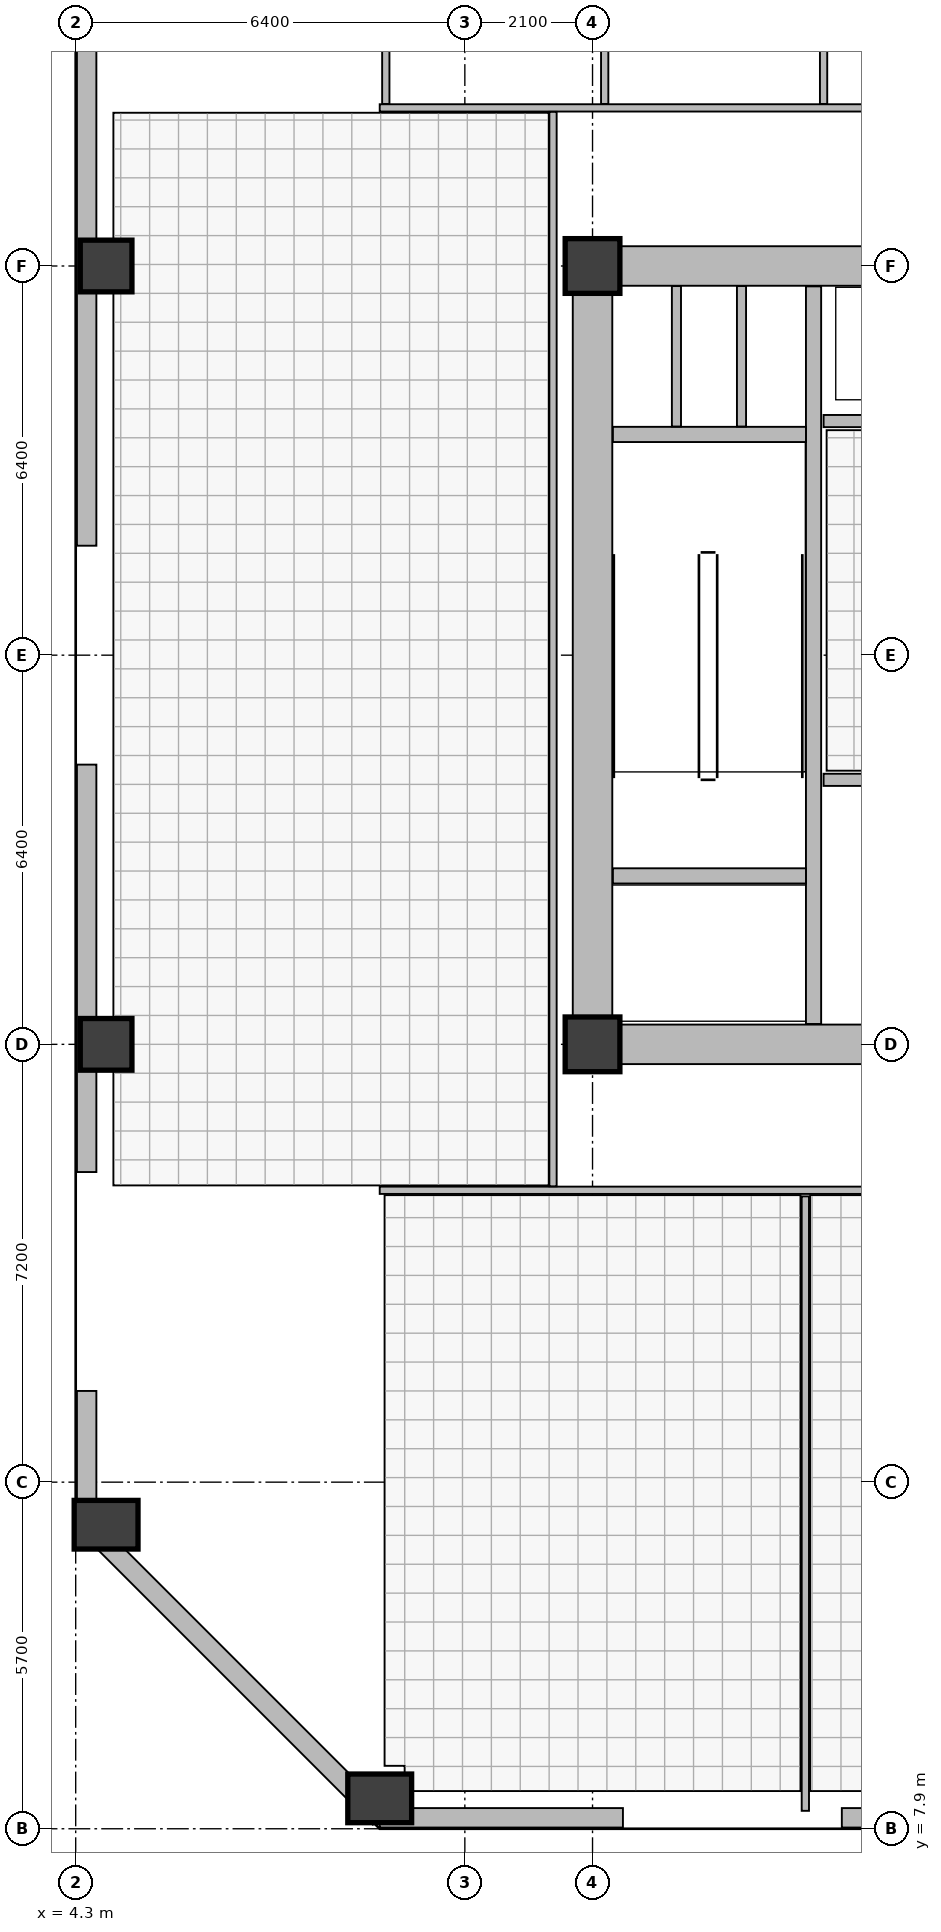
"""IFC4 building model, lengths in metres.
Left out: names, types, materials, properties, quantities, classifications, styles, units other than length and angle.
Written with IfcOpenShell. Run it as: python <this file> out.ifc"""

import sys

from ifc_helpers import new_model, si_unit, direction, frame, frame_2d, origin, origin_2d, place, context, subcontext, project, spatial, rectangle, extrude, element, fill, save


model = new_model("IFC4")
c1 = context("Model", 3, precision=1e-05, world=origin(), true_north=direction((0.0, 1.0)))
c2 = subcontext(c1, "Body", "Model", "MODEL_VIEW")
j1 = project(units=[si_unit("LENGTHUNIT", "METRE"), si_unit("PLANEANGLEUNIT", "RADIAN")], contexts=[c1])
p1 = place(None, origin())
s1 = spatial("IfcSite", under=j1, at=p1, CompositionType="ELEMENT")
p2 = place(p1, origin())
s2 = spatial("IfcBuilding", under=s1, at=p2, CompositionType="ELEMENT")
p3 = place(p2, frame((0.0, 0.0, 202.7)))
s3 = spatial("IfcBuildingStorey", under=s2, at=p3, CompositionType="ELEMENT", Elevation=202.7)
for number, where, z_axis, x_axis in (
    (1, (12.8, 20.8, 0.0), (0.0, 0.0, 1.0), (1.0, 0.0, 0.0)),
    (2, (12.8, 33.6, 0.0), (0.0, 0.0, 1.0), (1.0, 0.0, 0.0)),
):
    element("IfcColumn", number, at=place(p3, frame(where, z_axis=z_axis, x_axis=x_axis)), inside=s3, PredefinedType="COLUMN", context=c2, shape_type="SweptSolid", body=[
        extrude(rectangle(XDim=0.9, YDim=0.9, at=origin_2d()), origin(), (0.0, 0.0, 1.0), 4.8),
    ])
for number, where, z_axis, x_axis in (
    (3, (9.3, 8.4, 0.0), (0.0, 0.0, 1.0), (1.0, 0.0, 0.0)),
    (4, (4.8, 12.9, 0.0), (0.0, 0.0, 1.0), (1.0, 0.0, 0.0)),
):
    element("IfcColumn", number, at=place(p3, frame(where, z_axis=z_axis, x_axis=x_axis)), inside=s3, PredefinedType="COLUMN", context=c2, shape_type="SweptSolid", body=[
        extrude(rectangle(XDim=0.8, YDim=1.05, at=origin_2d()), origin(), (0.0, 0.0, 1.0), 4.8),
    ])
for number, where, z_axis, x_axis in (
    (5, (4.8, 20.8, 0.0), (0.0, 0.0, 1.0), (1.0, 0.0, 0.0)),
    (6, (4.8, 33.6, 0.0), (0.0, 0.0, 1.0), (1.0, 0.0, 0.0)),
):
    element("IfcColumn", number, at=place(p3, frame(where, z_axis=z_axis, x_axis=x_axis)), inside=s3, PredefinedType="COLUMN", context=c2, shape_type="SweptSolid", body=[
        extrude(rectangle(XDim=0.85, YDim=0.85, at=origin_2d()), origin(), (0.0, 0.0, 1.0), 4.8),
    ])
p4 = place(p3, frame((22.6, 8.08, 0.0), z_axis=(0.0, 0.0, 1.0), x_axis=(-1.0, 0.0, 0.0)))
e7 = element("IfcWall", 7, at=p4, inside=s3, PredefinedType="STANDARD", context=c2, shape_type="SweptSolid", body=[
    extrude(rectangle(XDim=5.7, YDim=0.32, at=frame_2d((2.85, 0.0))), origin(), (0.0, 0.0, 1.0), 3.735),
])
p5 = place(p3, frame((13.3, 8.08, 0.0), z_axis=(0.0, 0.0, 1.0), x_axis=(-1.0, 0.0, 0.0)))
e8 = element("IfcWall", 8, at=p5, inside=s3, PredefinedType="STANDARD", context=c2, shape_type="SweptSolid", body=[
    extrude(rectangle(XDim=4.0, YDim=0.32, at=frame_2d((2.0, 0.0))), origin(), (0.0, 0.0, 1.0), 3.735),
])
p6 = place(p3, frame((9.3, 8.08, 0.0), z_axis=(0.0, 0.0, 1.0), x_axis=(-0.707124689198, 0.707088872722, 0.0)))
e9 = element("IfcWall", 9, at=p6, inside=s3, PredefinedType="STANDARD", context=c2, shape_type="SweptSolid", body=[
    extrude(rectangle(XDim=6.816, YDim=0.32, at=frame_2d((3.408, 0.0))), origin(), (0.0, 0.0, 1.0), 3.735),
])
p7 = place(p3, frame((4.48, 12.9, 0.0), z_axis=(0.0, 0.0, 1.0), x_axis=(0.0, 1.0, 0.0)))
e10 = element("IfcWall", 10, at=p7, inside=s3, PredefinedType="STANDARD", context=c2, shape_type="SweptSolid", body=[
    extrude(rectangle(XDim=2.2, YDim=0.32, at=frame_2d((1.1, 0.0))), origin(), (0.0, 0.0, 1.0), 3.735),
])
p8 = place(p3, frame((4.48, 18.7, 0.0), z_axis=(0.0, 0.0, 1.0), x_axis=(0.0, 1.0, 0.0)))
e11 = element("IfcWall", 11, at=p8, inside=s3, PredefinedType="STANDARD", context=c2, shape_type="SweptSolid", body=[
    extrude(rectangle(XDim=6.7, YDim=0.32, at=frame_2d((3.35, 0.0))), origin(), (0.0, 0.0, 1.0), 3.735),
])
p9 = place(p3, frame((4.48, 29.0, 0.0), z_axis=(0.0, 0.0, 1.0), x_axis=(0.0, 1.0, 0.0)))
e12 = element("IfcWall", 12, at=p9, inside=s3, PredefinedType="STANDARD", context=c2, shape_type="SweptSolid", body=[
    extrude(rectangle(XDim=18.9, YDim=0.32, at=frame_2d((9.45, 0.0))), origin(), (0.0, 0.0, 1.0), 3.735),
])
p10 = place(p3, frame((12.8, 21.255, 0.0), z_axis=(0.0, 0.0, 1.0), x_axis=(0.0, 1.0, 0.0)))
e13 = element("IfcWall", 13, at=p10, inside=s3, PredefinedType="SHEAR", context=c2, shape_type="SweptSolid", body=[
    extrude(rectangle(XDim=11.89, YDim=0.65, at=frame_2d((5.945, 0.0))), origin(), (0.0, 0.0, 1.0), 4.35),
])
p11 = place(p3, frame((13.255, 20.8, 0.0), z_axis=(0.0, 0.0, 1.0), x_axis=(1.0, 0.0, 0.0)))
e14 = element("IfcWall", 14, at=p11, inside=s3, PredefinedType="SHEAR", context=c2, shape_type="SweptSolid", body=[
    extrude(rectangle(XDim=7.09, YDim=0.65, at=frame_2d((3.545, 0.0))), origin(), (0.0, 0.0, 1.0), 4.35),
])
p12 = place(p3, frame((13.255, 33.6, 0.0), z_axis=(0.0, 0.0, 1.0), x_axis=(1.0, 0.0, 0.0)))
e15 = element("IfcWall", 15, at=p12, inside=s3, PredefinedType="SHEAR", context=c2, shape_type="SweptSolid", body=[
    extrude(rectangle(XDim=7.09, YDim=0.65, at=frame_2d((3.545, 0.0))), origin(), (0.0, 0.0, 1.0), 4.35),
])
p13 = place(p12, frame((2.115, 0.0, 0.0)))
e16 = element("IfcOpeningElement", 16, at=p13, cuts=e15, PredefinedType="OPENING", context=c2, shape_type="SweptSolid", body=[
    extrude(rectangle(XDim=0.85, YDim=2.02, at=frame_2d((0.425, 1.01))), frame((0.0, 0.335, 0.0), z_axis=(0.0, -1.0, 0.0), x_axis=(1.0, 0.0, 0.0)), (0.0, 0.0, 1.0), 0.67),
])
p14 = place(p3, frame((16.435, 21.135, 0.0), z_axis=(0.0, 0.0, 1.0), x_axis=(0.0, 1.0, 0.0)))
e17 = element("IfcWall", 17, at=p14, inside=s3, PredefinedType="SHEAR", context=c2, shape_type="SweptSolid", body=[
    extrude(rectangle(XDim=12.13, YDim=0.25, at=frame_2d((6.065, 0.0))), origin(), (0.0, 0.0, 1.0), 4.35),
])
p15 = place(p14, frame((0.515, 0.0, 0.0)))
e18 = element("IfcOpeningElement", 18, at=p15, cuts=e17, PredefinedType="OPENING", context=c2, shape_type="SweptSolid", body=[
    extrude(rectangle(XDim=1.2, YDim=2.15, at=frame_2d((0.6, 1.075))), frame((0.0, 0.135, 0.0), z_axis=(0.0, -1.0, 0.0), x_axis=(1.0, 0.0, 0.0)), (0.0, 0.0, 1.0), 0.27),
])
p16 = place(p14, frame((2.665, 0.0, 0.0)))
e19 = element("IfcOpeningElement", 19, at=p16, cuts=e17, PredefinedType="OPENING", context=c2, shape_type="SweptSolid", body=[
    extrude(rectangle(XDim=1.15, YDim=2.15, at=frame_2d((0.575, 1.075))), frame((0.0, 0.135, 0.0), z_axis=(0.0, -1.0, 0.0), x_axis=(1.0, 0.0, 0.0)), (0.0, 0.0, 1.0), 0.27),
])
for number, where, z_axis, x_axis in (
    (20, (13.135, 23.57, 0.0), (0.0, 0.0, 1.0), (1.0, 0.0, 0.0)),
    (21, (13.135, 30.83, 0.0), (0.0, 0.0, 1.0), (1.0, 0.0, 0.0)),
):
    element("IfcWall", number, at=place(p3, frame(where, z_axis=z_axis, x_axis=x_axis)), inside=s3, PredefinedType="SHEAR", context=c2, shape_type="SweptSolid", body=[
        extrude(rectangle(XDim=3.175, YDim=0.25, at=frame_2d((1.587, 0.0))), origin(), (0.0, 0.0, 1.0), 4.35),
    ])
for number, where, z_axis, x_axis in (
    (22, (16.6, 25.15, 0.0), (0.0, 0.0, 1.0), (1.0, 0.0, 0.0)),
    (23, (16.6, 31.05, 0.0), (0.0, 0.0, 1.0), (1.0, 0.0, 0.0)),
):
    element("IfcWall", number, at=place(p3, frame(where, z_axis=z_axis, x_axis=x_axis)), inside=s3, PredefinedType="SOLIDWALL", context=c2, shape_type="SweptSolid", body=[
        extrude(rectangle(XDim=3.85, YDim=0.2, at=frame_2d((1.925, 0.0))), origin(), (0.0, 0.0, 1.0), 4.35),
    ])
p17 = place(p3, frame((14.18, 30.96, 0.0), z_axis=(0.0, 0.0, 1.0), x_axis=(0.0, 1.0, 0.0)))
e24 = element("IfcWall", 24, at=p17, inside=s3, PredefinedType="PARTITIONING", context=c2, shape_type="SweptSolid", body=[
    extrude(rectangle(XDim=2.31, YDim=0.15, at=frame_2d((1.155, 0.0))), origin(), (0.0, 0.0, 1.0), 4.35),
])
p18 = place(p17, frame((0.47, 0.0, 0.0)))
e25 = element("IfcOpeningElement", 25, at=p18, cuts=e24, PredefinedType="OPENING", context=c2, shape_type="SweptSolid", body=[
    extrude(rectangle(XDim=0.85, YDim=2.02, at=frame_2d((0.425, 1.01))), frame((0.0, 0.085, 0.0), z_axis=(0.0, -1.0, 0.0), x_axis=(1.0, 0.0, 0.0)), (0.0, 0.0, 1.0), 0.17),
])
p19 = place(p3, frame((15.25, 30.96, 0.0), z_axis=(0.0, 0.0, 1.0), x_axis=(0.0, 1.0, 0.0)))
e26 = element("IfcWall", 26, at=p19, inside=s3, PredefinedType="PARTITIONING", context=c2, shape_type="SweptSolid", body=[
    extrude(rectangle(XDim=2.31, YDim=0.15, at=frame_2d((1.155, 0.0))), origin(), (0.0, 0.0, 1.0), 4.35),
])
p20 = place(p19, frame((0.47, 0.0, 0.0)))
e27 = element("IfcOpeningElement", 27, at=p20, cuts=e26, PredefinedType="OPENING", context=c2, shape_type="SweptSolid", body=[
    extrude(rectangle(XDim=0.85, YDim=2.02, at=frame_2d((0.425, 1.01))), frame((0.0, 0.085, 0.0), z_axis=(0.0, -1.0, 0.0), x_axis=(1.0, 0.0, 0.0)), (0.0, 0.0, 1.0), 0.17),
])
p21 = place(p3, frame((9.3, 18.4, 0.0), z_axis=(0.0, 0.0, 1.0), x_axis=(1.0, 0.0, 0.0)))
e28 = element("IfcWall", 28, at=p21, inside=s3, PredefinedType="PARTITIONING", context=c2, shape_type="SweptSolid", body=[
    extrude(rectangle(XDim=35.0, YDim=0.12, at=frame_2d((17.5, 0.0))), origin(), (0.0, 0.0, 1.0), 4.35),
])
p22 = place(p21, frame((2.2, 0.0, 0.0)))
e29 = element("IfcOpeningElement", 29, at=p22, cuts=e28, PredefinedType="OPENING", context=c2, shape_type="SweptSolid", body=[
    extrude(rectangle(XDim=1.0, YDim=2.1, at=frame_2d((0.5, 1.05))), frame((0.0, 0.07, 0.0), z_axis=(0.0, -1.0, 0.0), x_axis=(1.0, 0.0, 0.0)), (0.0, 0.0, 1.0), 0.14),
])
p23 = place(p21, frame((9.2, 0.0, 0.0)))
e30 = element("IfcOpeningElement", 30, at=p23, cuts=e28, PredefinedType="OPENING", context=c2, shape_type="SweptSolid", body=[
    extrude(rectangle(XDim=1.0, YDim=2.1, at=frame_2d((0.5, 1.05))), frame((0.0, 0.07, 0.0), z_axis=(0.0, -1.0, 0.0), x_axis=(1.0, 0.0, 0.0)), (0.0, 0.0, 1.0), 0.14),
])
p24 = place(p21, frame((16.55, 0.0, 0.0)))
e31 = element("IfcOpeningElement", 31, at=p24, cuts=e28, PredefinedType="OPENING", context=c2, shape_type="SweptSolid", body=[
    extrude(rectangle(XDim=1.0, YDim=2.1, at=frame_2d((0.5, 1.05))), frame((0.0, 0.07, 0.0), z_axis=(0.0, -1.0, 0.0), x_axis=(1.0, 0.0, 0.0)), (0.0, 0.0, 1.0), 0.14),
])
p25 = place(p21, frame((23.9, 0.0, 0.0)))
e32 = element("IfcOpeningElement", 32, at=p25, cuts=e28, PredefinedType="OPENING", context=c2, shape_type="SweptSolid", body=[
    extrude(rectangle(XDim=1.0, YDim=2.1, at=frame_2d((0.5, 1.05))), frame((0.0, 0.07, 0.0), z_axis=(0.0, -1.0, 0.0), x_axis=(1.0, 0.0, 0.0)), (0.0, 0.0, 1.0), 0.14),
])
p26 = place(p21, frame((30.55, 0.0, 0.0)))
e33 = element("IfcOpeningElement", 33, at=p26, cuts=e28, PredefinedType="OPENING", context=c2, shape_type="SweptSolid", body=[
    extrude(rectangle(XDim=1.0, YDim=2.1, at=frame_2d((0.5, 1.05))), frame((0.0, 0.07, 0.0), z_axis=(0.0, -1.0, 0.0), x_axis=(1.0, 0.0, 0.0)), (0.0, 0.0, 1.0), 0.14),
])
p27 = place(p3, frame((9.3, 36.2, 0.0), z_axis=(0.0, 0.0, 1.0), x_axis=(1.0, 0.0, 0.0)))
e34 = element("IfcWall", 34, at=p27, inside=s3, PredefinedType="PARTITIONING", context=c2, shape_type="SweptSolid", body=[
    extrude(rectangle(XDim=35.0, YDim=0.12, at=frame_2d((17.5, 0.0))), origin(), (0.0, 0.0, 1.0), 4.35),
])
p28 = place(p27, frame((1.3, 0.0, 0.0)))
e35 = element("IfcOpeningElement", 35, at=p28, cuts=e34, PredefinedType="OPENING", context=c2, shape_type="SweptSolid", body=[
    extrude(rectangle(XDim=0.95, YDim=2.1, at=frame_2d((0.475, 1.05))), frame((0.0, 0.07, 0.0), z_axis=(0.0, -1.0, 0.0), x_axis=(1.0, 0.0, 0.0)), (0.0, 0.0, 1.0), 0.14),
])
p29 = place(p27, frame((4.9, 0.0, 0.0)))
e36 = element("IfcOpeningElement", 36, at=p29, cuts=e34, PredefinedType="OPENING", context=c2, shape_type="SweptSolid", body=[
    extrude(rectangle(XDim=0.95, YDim=2.1, at=frame_2d((0.475, 1.05))), frame((0.0, 0.07, 0.0), z_axis=(0.0, -1.0, 0.0), x_axis=(1.0, 0.0, 0.0)), (0.0, 0.0, 1.0), 0.14),
])
p30 = place(p27, frame((8.3, 0.0, 0.0)))
e37 = element("IfcOpeningElement", 37, at=p30, cuts=e34, PredefinedType="OPENING", context=c2, shape_type="SweptSolid", body=[
    extrude(rectangle(XDim=1.0, YDim=2.1, at=frame_2d((0.5, 1.05))), frame((0.0, 0.07, 0.0), z_axis=(0.0, -1.0, 0.0), x_axis=(1.0, 0.0, 0.0)), (0.0, 0.0, 1.0), 0.14),
])
p31 = place(p27, frame((13.5, 0.0, 0.0)))
e38 = element("IfcOpeningElement", 38, at=p31, cuts=e34, PredefinedType="OPENING", context=c2, shape_type="SweptSolid", body=[
    extrude(rectangle(XDim=1.5, YDim=2.15, at=frame_2d((0.75, 1.075))), frame((0.0, 0.07, 0.0), z_axis=(0.0, -1.0, 0.0), x_axis=(1.0, 0.0, 0.0)), (0.0, 0.0, 1.0), 0.14),
])
p32 = place(p27, frame((28.0, 0.0, 0.0)))
e39 = element("IfcOpeningElement", 39, at=p32, cuts=e34, PredefinedType="OPENING", context=c2, shape_type="SweptSolid", body=[
    extrude(rectangle(XDim=1.0, YDim=2.1, at=frame_2d((0.5, 1.05))), frame((0.0, 0.07, 0.0), z_axis=(0.0, -1.0, 0.0), x_axis=(1.0, 0.0, 0.0)), (0.0, 0.0, 1.0), 0.14),
])
p33 = place(p3, frame((16.3, 8.195, 0.0), z_axis=(0.0, 0.0, 1.0), x_axis=(0.0, 1.0, 0.0)))
e40 = element("IfcWall", 40, at=p33, inside=s3, PredefinedType="PARTITIONING", context=c2, shape_type="SweptSolid", body=[
    extrude(rectangle(XDim=10.105, YDim=0.12, at=frame_2d((5.052, 0.0))), origin(), (0.0, 0.0, 1.0), 3.785),
])
for number, where, z_axis, x_axis in (
    (41, (9.4, 36.265, 0.0), (0.0, 0.0, 1.0), (0.0, 1.0, 0.0)),
    (42, (13.0, 36.265, 0.0), (0.0, 0.0, 1.0), (0.0, 1.0, 0.0)),
):
    element("IfcWall", number, at=place(p3, frame(where, z_axis=z_axis, x_axis=x_axis)), inside=s3, PredefinedType="PARTITIONING", context=c2, shape_type="SweptSolid", body=[
        extrude(rectangle(XDim=16.29, YDim=0.12, at=frame_2d((8.145, 0.0))), origin(), (0.0, 0.0, 1.0), 4.35),
    ])
p34 = place(p3, frame((16.6, 36.265, 0.0), z_axis=(0.0, 0.0, 1.0), x_axis=(0.0, 1.0, 0.0)))
e43 = element("IfcWall", 43, at=p34, inside=s3, PredefinedType="PARTITIONING", context=c2, shape_type="SweptSolid", body=[
    extrude(rectangle(XDim=16.29, YDim=0.12, at=frame_2d((8.145, 0.0))), origin(), (0.0, 0.0, 1.0), 3.785),
])
p35 = place(p3, frame((12.15, 18.465, 0.0), z_axis=(0.0, 0.0, 1.0), x_axis=(0.0, 1.0, 0.0)))
e44 = element("IfcWall", 44, at=p35, inside=s3, PredefinedType="PARTITIONING", context=c2, shape_type="SweptSolid", body=[
    extrude(rectangle(XDim=17.67, YDim=0.12, at=frame_2d((8.835, 0.0))), origin(), (0.0, 0.0, 1.0), 4.35),
])
p36 = place(p35, frame((0.385, 0.0, 0.0)))
e45 = element("IfcOpeningElement", 45, at=p36, cuts=e44, PredefinedType="OPENING", context=c2, shape_type="SweptSolid", body=[
    extrude(rectangle(XDim=1.1, YDim=2.15, at=frame_2d((0.55, 1.075))), frame((0.0, 0.07, 0.0), z_axis=(0.0, -1.0, 0.0), x_axis=(1.0, 0.0, 0.0)), (0.0, 0.0, 1.0), 0.14),
])
p37 = place(p13, origin())
e46 = element("IfcDoor", 46, at=p37, inside=s3, OperationType="SINGLE_SWING_RIGHT", PredefinedType="DOOR", context=c2, shape_type="SweptSolid", body=[
    extrude(rectangle(XDim=0.85, YDim=2.02, at=frame_2d((0.425, 1.01))), frame((0.0, 0.025, 0.0), z_axis=(0.0, -1.0, 0.0), x_axis=(1.0, 0.0, 0.0)), (0.0, 0.0, 1.0), 0.05),
])
fill(e16, e46)
p38 = place(p15, origin())
e47 = element("IfcDoor", 47, at=p38, inside=s3, OperationType="DOUBLE_DOOR_SLIDING", PredefinedType="DOOR", context=c2, shape_type="SweptSolid", body=[
    extrude(rectangle(XDim=1.2, YDim=2.15, at=frame_2d((0.6, 1.075))), frame((0.0, 0.025, 0.0), z_axis=(0.0, -1.0, 0.0), x_axis=(1.0, 0.0, 0.0)), (0.0, 0.0, 1.0), 0.05),
])
fill(e18, e47)
p39 = place(p16, origin())
e48 = element("IfcDoor", 48, at=p39, inside=s3, OperationType="SINGLE_SWING_RIGHT", PredefinedType="DOOR", context=c2, shape_type="SweptSolid", body=[
    extrude(rectangle(XDim=1.15, YDim=2.15, at=frame_2d((0.575, 1.075))), frame((0.0, 0.025, 0.0), z_axis=(0.0, -1.0, 0.0), x_axis=(1.0, 0.0, 0.0)), (0.0, 0.0, 1.0), 0.05),
])
fill(e19, e48)
p40 = place(p18, origin())
e49 = element("IfcDoor", 49, at=p40, inside=s3, OperationType="SINGLE_SWING_LEFT", PredefinedType="DOOR", context=c2, shape_type="SweptSolid", body=[
    extrude(rectangle(XDim=0.85, YDim=2.02, at=frame_2d((0.425, 1.01))), frame((0.0, 0.025, 0.0), z_axis=(0.0, -1.0, 0.0), x_axis=(1.0, 0.0, 0.0)), (0.0, 0.0, 1.0), 0.05),
])
fill(e25, e49)
p41 = place(p20, origin())
e50 = element("IfcDoor", 50, at=p41, inside=s3, OperationType="SINGLE_SWING_RIGHT", PredefinedType="DOOR", context=c2, shape_type="SweptSolid", body=[
    extrude(rectangle(XDim=0.85, YDim=2.02, at=frame_2d((0.425, 1.01))), frame((0.0, 0.025, 0.0), z_axis=(0.0, -1.0, 0.0), x_axis=(1.0, 0.0, 0.0)), (0.0, 0.0, 1.0), 0.05),
])
fill(e27, e50)
p42 = place(p22, origin())
e51 = element("IfcDoor", 51, at=p42, inside=s3, OperationType="SINGLE_SWING_RIGHT", PredefinedType="DOOR", context=c2, shape_type="SweptSolid", body=[
    extrude(rectangle(XDim=1.0, YDim=2.1, at=frame_2d((0.5, 1.05))), frame((0.0, 0.025, 0.0), z_axis=(0.0, -1.0, 0.0), x_axis=(1.0, 0.0, 0.0)), (0.0, 0.0, 1.0), 0.05),
])
fill(e29, e51)
p43 = place(p28, origin())
e52 = element("IfcDoor", 52, at=p43, inside=s3, OperationType="SINGLE_SWING_LEFT", PredefinedType="DOOR", context=c2, shape_type="SweptSolid", body=[
    extrude(rectangle(XDim=0.95, YDim=2.1, at=frame_2d((0.475, 1.05))), frame((0.0, 0.025, 0.0), z_axis=(0.0, -1.0, 0.0), x_axis=(1.0, 0.0, 0.0)), (0.0, 0.0, 1.0), 0.05),
])
fill(e35, e52)
p44 = place(p29, origin())
e53 = element("IfcDoor", 53, at=p44, inside=s3, OperationType="SINGLE_SWING_RIGHT", PredefinedType="DOOR", context=c2, shape_type="SweptSolid", body=[
    extrude(rectangle(XDim=0.95, YDim=2.1, at=frame_2d((0.475, 1.05))), frame((0.0, 0.025, 0.0), z_axis=(0.0, -1.0, 0.0), x_axis=(1.0, 0.0, 0.0)), (0.0, 0.0, 1.0), 0.05),
])
fill(e36, e53)
p45 = place(p36, origin())
e54 = element("IfcDoor", 54, at=p45, inside=s3, OperationType="SINGLE_SWING_RIGHT", PredefinedType="DOOR", context=c2, shape_type="SweptSolid", body=[
    extrude(rectangle(XDim=1.1, YDim=2.15, at=frame_2d((0.55, 1.075))), frame((0.0, 0.025, 0.0), z_axis=(0.0, -1.0, 0.0), x_axis=(1.0, 0.0, 0.0)), (0.0, 0.0, 1.0), 0.05),
])
fill(e45, e54)
save(model, sys.argv[1])
